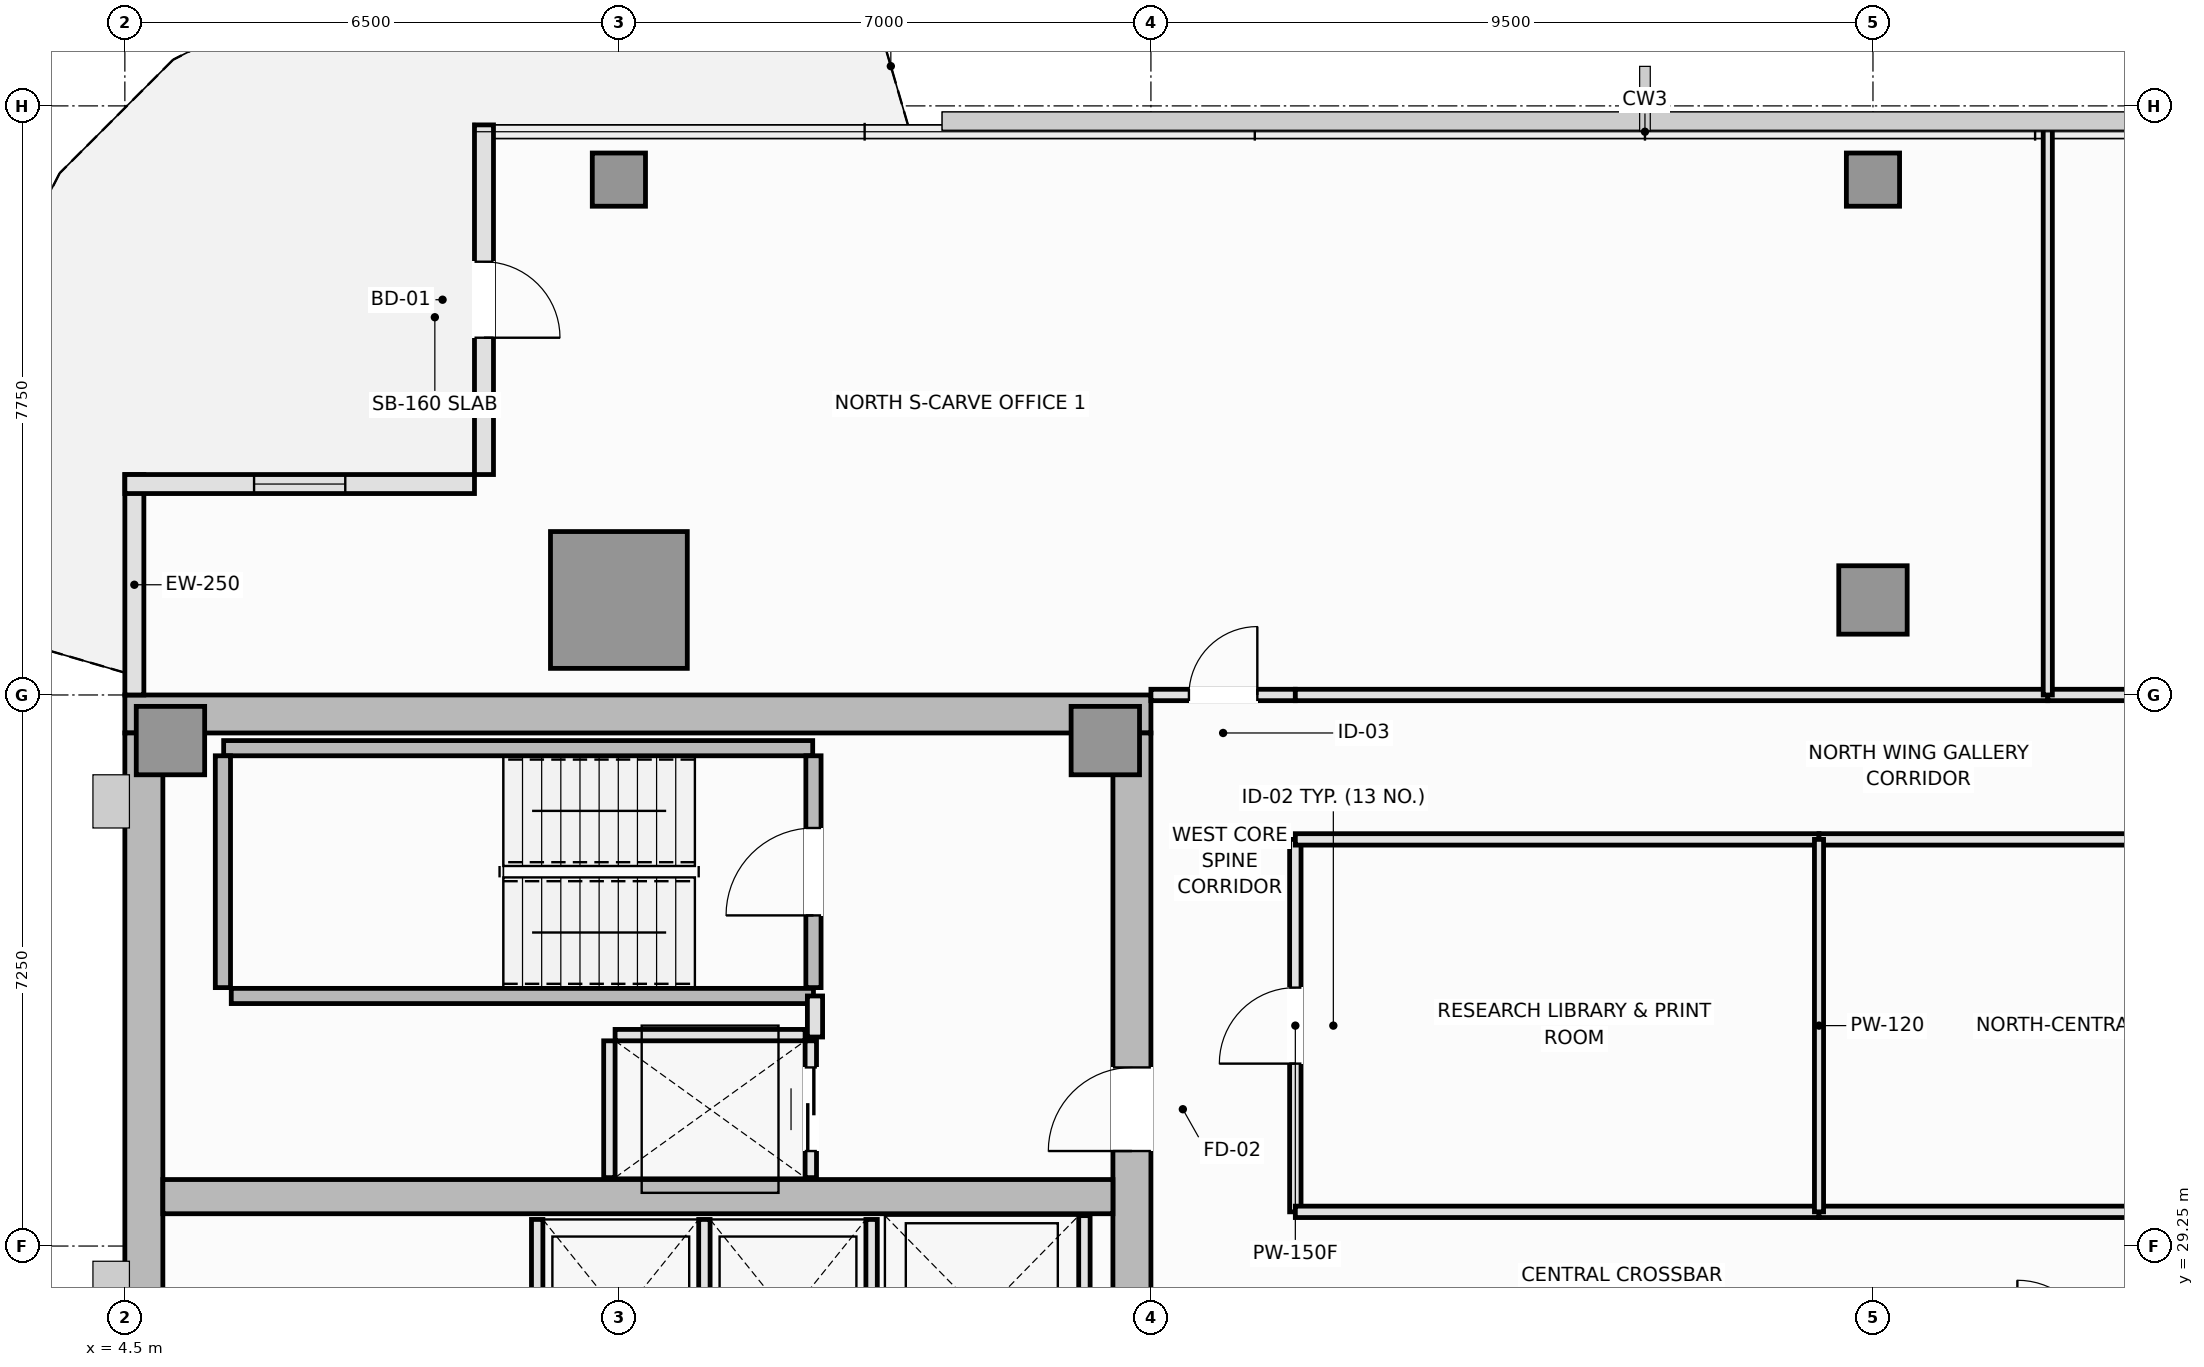
"""IFC4 building model, lengths in metres.
Left out: names, types, materials, properties, quantities, classifications, styles, units other than length and angle.
Written with IfcOpenShell. Run it as: python <this file> out.ifc"""

import sys

from ifc_helpers import new_model, si_unit, direction, frame, frame_2d, origin, origin_2d, place, context, subcontext, project, spatial, rectangle, extrude, element, fill, save


model = new_model("IFC4")
c1 = context("Model", 3, precision=1e-05, world=origin(), true_north=direction((0.0, 1.0)))
c2 = subcontext(c1, "Body", "Model", "MODEL_VIEW")
j1 = project(units=[si_unit("LENGTHUNIT", "METRE"), si_unit("PLANEANGLEUNIT", "RADIAN")], contexts=[c1])
p1 = place(None, origin())
s1 = spatial("IfcSite", under=j1, at=p1, CompositionType="ELEMENT")
p2 = place(p1, origin())
s2 = spatial("IfcBuilding", under=s1, at=p2, CompositionType="ELEMENT")
p3 = place(p2, frame((0.0, 0.0, 284.75)))
s3 = spatial("IfcBuildingStorey", under=s2, at=p3, CompositionType="ELEMENT", Elevation=284.75)
p4 = place(p3, frame((4.5, 36.25, 0.0), z_axis=(0.0, 0.0, 1.0), x_axis=(1.0, 0.0, 0.0)))
e1 = element("IfcWall", 1, at=p4, inside=s3, PredefinedType="SHEAR", context=c2, shape_type="SweptSolid", body=[
    extrude(rectangle(XDim=13.5, YDim=0.5, at=frame_2d((6.75, 0.0))), origin(), (0.0, 0.0, 1.0), 3.55),
])
p5 = place(p3, frame((4.75, 14.5, 0.0), z_axis=(0.0, 0.0, 1.0), x_axis=(0.0, 1.0, 0.0)))
e2 = element("IfcWall", 2, at=p5, inside=s3, PredefinedType="SHEAR", context=c2, shape_type="SweptSolid", body=[
    extrude(rectangle(XDim=21.5, YDim=0.5, at=frame_2d((10.75, 0.0))), origin(), (0.0, 0.0, 1.0), 3.55),
])
p6 = place(p3, frame((17.75, 27.05, 0.0), z_axis=(0.0, 0.0, 1.0), x_axis=(0.0, 1.0, 0.0)))
e3 = element("IfcWall", 3, at=p6, inside=s3, PredefinedType="SHEAR", context=c2, shape_type="SweptSolid", body=[
    extrude(rectangle(XDim=8.95, YDim=0.5, at=frame_2d((4.475, 0.0))), origin(), (0.0, 0.0, 1.0), 3.55),
])
p7 = place(p6, frame((3.45, 0.0, 0.0)))
e4 = element("IfcOpeningElement", 4, at=p7, cuts=e3, PredefinedType="OPENING", context=c2, shape_type="SweptSolid", body=[
    extrude(rectangle(XDim=1.1, YDim=2.15, at=frame_2d((0.55, 1.075))), frame((0.0, 0.26, 0.0), z_axis=(0.0, -1.0, 0.0), x_axis=(1.0, 0.0, 0.0)), (0.0, 0.0, 1.0), 0.52),
])
p8 = place(p3, frame((5.0, 29.9, 0.0), z_axis=(0.0, 0.0, 1.0), x_axis=(1.0, 0.0, 0.0)))
e5 = element("IfcWall", 5, at=p8, inside=s3, PredefinedType="SHEAR", context=c2, shape_type="SweptSolid", body=[
    extrude(rectangle(XDim=12.5, YDim=0.45, at=frame_2d((6.25, 0.0))), origin(), (0.0, 0.0, 1.0), 3.55),
])
for number, where, z_axis, x_axis in (
    (6, (5.1, 35.9, 0.0), (0.0, 0.0, 1.0), (1.0, 0.0, 0.0)),
    (7, (17.4, 35.9, 0.0), (0.0, 0.0, 1.0), (1.0, 0.0, 0.0)),
):
    element("IfcColumn", number, at=place(p3, frame(where, z_axis=z_axis, x_axis=x_axis)), inside=s3, PredefinedType="PILASTER", context=c2, shape_type="SweptSolid", body=[
        extrude(rectangle(XDim=0.9, YDim=0.9, at=origin_2d()), origin(), (0.0, 0.0, 1.0), 3.55),
    ])
p9 = place(p3, frame((11.0, 37.75, 0.0), z_axis=(0.0, 0.0, 1.0), x_axis=(1.0, 0.0, 0.0)))
e8 = element("IfcColumn", 8, at=p9, inside=s3, PredefinedType="COLUMN", context=c2, shape_type="SweptSolid", body=[
    extrude(rectangle(XDim=1.8, YDim=1.8, at=origin_2d()), origin(), (0.0, 0.0, 1.0), 3.55),
])
p10 = place(p3, frame((27.5, 37.75, 0.0), z_axis=(0.0, 0.0, 1.0), x_axis=(1.0, 0.0, 0.0)))
e9 = element("IfcColumn", 9, at=p10, inside=s3, PredefinedType="COLUMN", context=c2, shape_type="SweptSolid", body=[
    extrude(rectangle(XDim=0.9, YDim=0.9, at=origin_2d()), origin(), (0.0, 0.0, 1.0), 3.55),
])
for number, where, z_axis, x_axis in (
    (10, (11.0, 43.28, 0.0), (0.0, 0.0, 1.0), (1.0, 0.0, 0.0)),
    (11, (27.5, 43.28, 0.0), (0.0, 0.0, 1.0), (1.0, 0.0, 0.0)),
):
    element("IfcColumn", number, at=place(p3, frame(where, z_axis=z_axis, x_axis=x_axis)), inside=s3, PredefinedType="COLUMN", context=c2, shape_type="SweptSolid", body=[
        extrude(rectangle(XDim=0.7, YDim=0.7, at=origin_2d()), origin(), (0.0, 0.0, 1.0), 3.55),
    ])
p11 = place(p3, frame((4.625, 39.4, 0.0), z_axis=(0.0, 0.0, 1.0), x_axis=(0.0, -1.0, 0.0)))
e12 = element("IfcWall", 12, at=p11, inside=s3, PredefinedType="SOLIDWALL", context=c2, shape_type="SweptSolid", body=[
    extrude(rectangle(XDim=2.9, YDim=0.25, at=frame_2d((1.45, 0.0))), origin(), (0.0, 0.0, 1.0), 3.39),
])
p12 = place(p3, frame((9.225, 44.0, 0.0), z_axis=(0.0, 0.0, 1.0), x_axis=(0.0, -1.0, 0.0)))
e13 = element("IfcWall", 13, at=p12, inside=s3, PredefinedType="SOLIDWALL", context=c2, shape_type="SweptSolid", body=[
    extrude(rectangle(XDim=4.6, YDim=0.25, at=frame_2d((2.3, 0.0))), origin(), (0.0, 0.0, 1.0), 3.39),
])
p13 = place(p12, frame((1.8, 0.0, 0.0)))
e14 = element("IfcOpeningElement", 14, at=p13, cuts=e13, PredefinedType="OPENING", context=c2, shape_type="SweptSolid", body=[
    extrude(rectangle(XDim=1.0, YDim=2.2, at=frame_2d((0.5, 1.1))), frame((0.0, 0.135, 0.0), z_axis=(0.0, -1.0, 0.0), x_axis=(1.0, 0.0, 0.0)), (0.0, 0.0, 1.0), 0.27),
])
p14 = place(p3, frame((9.1, 39.275, 0.0), z_axis=(0.0, 0.0, 1.0), x_axis=(-1.0, 0.0, 0.0)))
e15 = element("IfcWall", 15, at=p14, inside=s3, PredefinedType="SOLIDWALL", context=c2, shape_type="SweptSolid", body=[
    extrude(rectangle(XDim=4.6, YDim=0.25, at=frame_2d((2.3, 0.0))), origin(), (0.0, 0.0, 1.0), 3.12),
])
p15 = place(p14, frame((1.7, 0.0, 0.9)))
e16 = element("IfcOpeningElement", 16, at=p15, cuts=e15, PredefinedType="OPENING", context=c2, shape_type="SweptSolid", body=[
    extrude(rectangle(XDim=1.2, YDim=1.8, at=frame_2d((0.6, 0.9))), frame((0.0, 0.135, 0.0), z_axis=(0.0, -1.0, 0.0), x_axis=(1.0, 0.0, 0.0)), (0.0, 0.0, 1.0), 0.27),
])
p16 = place(p3, frame((5.8, 35.8, 0.0), z_axis=(0.0, 0.0, 1.0), x_axis=(1.0, 0.0, 0.0)))
e17 = element("IfcWall", 17, at=p16, inside=s3, PredefinedType="SOLIDWALL", context=c2, shape_type="SweptSolid", body=[
    extrude(rectangle(XDim=7.75, YDim=0.2, at=frame_2d((3.875, 0.0))), origin(), (0.0, 0.0, 1.0), 3.55),
])
p17 = place(p3, frame((5.79, 32.65, 0.0), z_axis=(0.0, 0.0, 1.0), x_axis=(0.0, 1.0, 0.0)))
e18 = element("IfcWall", 18, at=p17, inside=s3, PredefinedType="SOLIDWALL", context=c2, shape_type="SweptSolid", body=[
    extrude(rectangle(XDim=3.05, YDim=0.2, at=frame_2d((1.525, 0.0))), origin(), (0.0, 0.0, 1.0), 3.55),
])
p18 = place(p3, frame((5.9, 32.54, 0.0), z_axis=(0.0, 0.0, 1.0), x_axis=(1.0, 0.0, 0.0)))
e19 = element("IfcWall", 19, at=p18, inside=s3, PredefinedType="SOLIDWALL", context=c2, shape_type="SweptSolid", body=[
    extrude(rectangle(XDim=7.66, YDim=0.2, at=frame_2d((3.83, 0.0))), origin(), (0.0, 0.0, 1.0), 3.55),
])
p19 = place(p3, frame((13.56, 32.65, 0.0), z_axis=(0.0, 0.0, 1.0), x_axis=(0.0, 1.0, 0.0)))
e20 = element("IfcWall", 20, at=p19, inside=s3, PredefinedType="SOLIDWALL", context=c2, shape_type="SweptSolid", body=[
    extrude(rectangle(XDim=3.05, YDim=0.2, at=frame_2d((1.525, 0.0))), origin(), (0.0, 0.0, 1.0), 3.55),
])
p20 = place(p19, frame((0.95, 0.0, 0.0)))
e21 = element("IfcOpeningElement", 21, at=p20, cuts=e20, PredefinedType="OPENING", context=c2, shape_type="SweptSolid", body=[
    extrude(rectangle(XDim=1.15, YDim=2.15, at=frame_2d((0.575, 1.075))), frame((0.0, 0.11, 0.0), z_axis=(0.0, -1.0, 0.0), x_axis=(1.0, 0.0, 0.0)), (0.0, 0.0, 1.0), 0.22),
])
for number, where, z_axis, x_axis in (
    (22, (9.925, 27.05, 0.0), (0.0, 0.0, 1.0), (0.0, 1.0, 0.0)),
    (23, (12.125, 27.05, 0.0), (0.0, 0.0, 1.0), (0.0, 1.0, 0.0)),
    (24, (14.325, 27.05, 0.0), (0.0, 0.0, 1.0), (0.0, 1.0, 0.0)),
):
    element("IfcWall", number, at=place(p3, frame(where, z_axis=z_axis, x_axis=x_axis)), inside=s3, PredefinedType="PARTITIONING", context=c2, shape_type="SweptSolid", body=[
        extrude(rectangle(XDim=2.55, YDim=0.15, at=frame_2d((1.275, 0.0))), origin(), (0.0, 0.0, 1.0), 3.39),
    ])
p21 = place(p3, frame((17.125, 27.05, 0.0), z_axis=(0.0, 0.0, 1.0), x_axis=(0.0, 1.0, 0.0)))
e25 = element("IfcWall", 25, at=p21, inside=s3, PredefinedType="PARTITIONING", context=c2, shape_type="SweptSolid", body=[
    extrude(rectangle(XDim=2.6, YDim=0.15, at=frame_2d((1.3, 0.0))), origin(), (0.0, 0.0, 1.0), 3.39),
])
p22 = place(p3, frame((10.95, 32.025, 0.0), z_axis=(0.0, 0.0, 1.0), x_axis=(1.0, 0.0, 0.0)))
e26 = element("IfcWall", 26, at=p22, inside=s3, PredefinedType="PARTITIONING", context=c2, shape_type="SweptSolid", body=[
    extrude(rectangle(XDim=2.5, YDim=0.15, at=frame_2d((1.25, 0.0))), origin(), (0.0, 0.0, 1.0), 3.39),
])
p23 = place(p3, frame((10.875, 30.15, 0.0), z_axis=(0.0, 0.0, 1.0), x_axis=(0.0, 1.0, 0.0)))
e27 = element("IfcWall", 27, at=p23, inside=s3, PredefinedType="PARTITIONING", context=c2, shape_type="SweptSolid", body=[
    extrude(rectangle(XDim=1.8, YDim=0.15, at=frame_2d((0.9, 0.0))), origin(), (0.0, 0.0, 1.0), 3.39),
])
p24 = place(p3, frame((13.525, 30.15, 0.0), z_axis=(0.0, 0.0, 1.0), x_axis=(0.0, 1.0, 0.0)))
e28 = element("IfcWall", 28, at=p24, inside=s3, PredefinedType="PARTITIONING", context=c2, shape_type="SweptSolid", body=[
    extrude(rectangle(XDim=1.8, YDim=0.15, at=frame_2d((0.9, 0.0))), origin(), (0.0, 0.0, 1.0), 3.39),
])
p25 = place(p24, frame((0.35, 0.0, 0.0)))
e29 = element("IfcOpeningElement", 29, at=p25, cuts=e28, PredefinedType="OPENING", context=c2, shape_type="SweptSolid", body=[
    extrude(rectangle(XDim=1.1, YDim=2.2, at=frame_2d((0.55, 1.1))), frame((0.0, 0.085, 0.0), z_axis=(0.0, -1.0, 0.0), x_axis=(1.0, 0.0, 0.0)), (0.0, 0.0, 1.0), 0.17),
])
p26 = place(p3, frame((13.58, 32.0, 0.0), z_axis=(0.0, 0.0, 1.0), x_axis=(0.0, 1.0, 0.0)))
e30 = element("IfcWall", 30, at=p26, inside=s3, PredefinedType="PARTITIONING", context=c2, shape_type="SweptSolid", body=[
    extrude(rectangle(XDim=0.54, YDim=0.2, at=frame_2d((0.27, 0.0))), origin(), (0.0, 0.0, 1.0), 3.39),
])
p27 = place(p3, frame((19.9, 29.7, 0.0), z_axis=(0.0, 0.0, 1.0), x_axis=(0.0, 1.0, 0.0)))
e31 = element("IfcWall", 31, at=p27, inside=s3, PredefinedType="PARTITIONING", context=c2, shape_type="SweptSolid", body=[
    extrude(rectangle(XDim=4.9, YDim=0.15, at=frame_2d((2.45, 0.0))), origin(), (0.0, 0.0, 1.0), 3.39),
])
p28 = place(p27, frame((1.95, 0.0, 0.0)))
e32 = element("IfcOpeningElement", 32, at=p28, cuts=e31, PredefinedType="OPENING", context=c2, shape_type="SweptSolid", body=[
    extrude(rectangle(XDim=1.0, YDim=2.15, at=frame_2d((0.5, 1.075))), frame((0.0, 0.085, 0.0), z_axis=(0.0, -1.0, 0.0), x_axis=(1.0, 0.0, 0.0)), (0.0, 0.0, 1.0), 0.17),
])
p29 = place(p3, frame((18.0, 36.5, 0.0), z_axis=(0.0, 0.0, 1.0), x_axis=(1.0, 0.0, 0.0)))
e33 = element("IfcWall", 33, at=p29, inside=s3, PredefinedType="PARTITIONING", context=c2, shape_type="SweptSolid", body=[
    extrude(rectangle(XDim=1.9, YDim=0.15, at=frame_2d((0.95, 0.0))), origin(), (0.0, 0.0, 1.0), 3.39),
])
p30 = place(p29, frame((0.5, 0.0, 0.0)))
e34 = element("IfcOpeningElement", 34, at=p30, cuts=e33, PredefinedType="OPENING", context=c2, shape_type="SweptSolid", body=[
    extrude(rectangle(XDim=0.9, YDim=2.1, at=frame_2d((0.45, 1.05))), frame((0.0, 0.085, 0.0), z_axis=(0.0, -1.0, 0.0), x_axis=(1.0, 0.0, 0.0)), (0.0, 0.0, 1.0), 0.17),
])
p31 = place(p3, frame((19.9, 29.7, 0.0), z_axis=(0.0, 0.0, 1.0), x_axis=(1.0, 0.0, 0.0)))
e35 = element("IfcWall", 35, at=p31, inside=s3, PredefinedType="PARTITIONING", context=c2, shape_type="SweptSolid", body=[
    extrude(rectangle(XDim=6.89, YDim=0.15, at=frame_2d((3.445, 0.0))), origin(), (0.0, 0.0, 1.0), 3.39),
])
p32 = place(p3, frame((26.79, 29.7, 0.0), z_axis=(0.0, 0.0, 1.0), x_axis=(1.0, 0.0, 0.0)))
e36 = element("IfcWall", 36, at=p32, inside=s3, PredefinedType="PARTITIONING", context=c2, shape_type="SweptSolid", body=[
    extrude(rectangle(XDim=9.51, YDim=0.15, at=frame_2d((4.755, 0.0))), origin(), (0.0, 0.0, 1.0), 3.39),
])
p33 = place(p3, frame((19.9, 34.6, 0.0), z_axis=(0.0, 0.0, 1.0), x_axis=(1.0, 0.0, 0.0)))
e37 = element("IfcWall", 37, at=p33, inside=s3, PredefinedType="PARTITIONING", context=c2, shape_type="SweptSolid", body=[
    extrude(rectangle(XDim=6.89, YDim=0.15, at=frame_2d((3.445, 0.0))), origin(), (0.0, 0.0, 1.0), 3.39),
])
p34 = place(p3, frame((26.79, 34.6, 0.0), z_axis=(0.0, 0.0, 1.0), x_axis=(1.0, 0.0, 0.0)))
e38 = element("IfcWall", 38, at=p34, inside=s3, PredefinedType="PARTITIONING", context=c2, shape_type="SweptSolid", body=[
    extrude(rectangle(XDim=9.51, YDim=0.15, at=frame_2d((4.755, 0.0))), origin(), (0.0, 0.0, 1.0), 3.39),
])
p35 = place(p3, frame((19.9, 36.5, 0.0), z_axis=(0.0, 0.0, 1.0), x_axis=(1.0, 0.0, 0.0)))
e39 = element("IfcWall", 39, at=p35, inside=s3, PredefinedType="PARTITIONING", context=c2, shape_type="SweptSolid", body=[
    extrude(rectangle(XDim=9.9, YDim=0.15, at=frame_2d((4.95, 0.0))), origin(), (0.0, 0.0, 1.0), 3.39),
])
p36 = place(p3, frame((29.8, 36.5, 0.0), z_axis=(0.0, 0.0, 1.0), x_axis=(1.0, 0.0, 0.0)))
e40 = element("IfcWall", 40, at=p36, inside=s3, PredefinedType="PARTITIONING", context=c2, shape_type="SweptSolid", body=[
    extrude(rectangle(XDim=4.2, YDim=0.15, at=frame_2d((2.1, 0.0))), origin(), (0.0, 0.0, 1.0), 3.39),
])
p37 = place(p36, frame((1.6, 0.0, 0.0)))
e41 = element("IfcOpeningElement", 41, at=p37, cuts=e40, PredefinedType="OPENING", context=c2, shape_type="SweptSolid", body=[
    extrude(rectangle(XDim=1.0, YDim=2.15, at=frame_2d((0.5, 1.075))), frame((0.0, 0.085, 0.0), z_axis=(0.0, -1.0, 0.0), x_axis=(1.0, 0.0, 0.0)), (0.0, 0.0, 1.0), 0.17),
])
p38 = place(p3, frame((26.79, 29.7, 0.0), z_axis=(0.0, 0.0, 1.0), x_axis=(0.0, 1.0, 0.0)))
e42 = element("IfcWall", 42, at=p38, inside=s3, PredefinedType="PARTITIONING", context=c2, shape_type="SweptSolid", body=[
    extrude(rectangle(XDim=4.9, YDim=0.12, at=frame_2d((2.45, 0.0))), origin(), (0.0, 0.0, 1.0), 3.39),
])
p39 = place(p3, frame((29.8, 36.5, 0.0), z_axis=(0.0, 0.0, 1.0), x_axis=(0.0, 1.0, 0.0)))
e43 = element("IfcWall", 43, at=p39, inside=s3, PredefinedType="PARTITIONING", context=c2, shape_type="SweptSolid", body=[
    extrude(rectangle(XDim=7.49, YDim=0.12, at=frame_2d((3.745, 0.0))), origin(), (0.0, 0.0, 1.0), 3.39),
])
p40 = place(p13, frame((1.0, 0.0, 0.0), z_axis=(0.0, 0.0, 1.0), x_axis=(-1.0, 0.0, 0.0)))
e44 = element("IfcDoor", 44, at=p40, inside=s3, OperationType="SINGLE_SWING_RIGHT", PredefinedType="DOOR", context=c2, shape_type="SweptSolid", body=[
    extrude(rectangle(XDim=1.0, YDim=2.2, at=frame_2d((0.5, 1.1))), frame((0.0, 0.025, 0.0), z_axis=(0.0, -1.0, 0.0), x_axis=(1.0, 0.0, 0.0)), (0.0, 0.0, 1.0), 0.05),
])
fill(e14, e44)
p41 = place(p15, origin())
e45 = element("IfcWindow", 45, at=p41, inside=s3, PartitioningType="SINGLE_PANEL", PredefinedType="WINDOW", context=c2, shape_type="SweptSolid", body=[
    extrude(rectangle(XDim=1.2, YDim=1.8, at=frame_2d((0.6, 0.9))), frame((0.0, 0.03, 0.0), z_axis=(0.0, -1.0, 0.0), x_axis=(1.0, 0.0, 0.0)), (0.0, 0.0, 1.0), 0.06),
])
fill(e16, e45)
p42 = place(p20, origin())
e46 = element("IfcDoor", 46, at=p42, inside=s3, OperationType="SINGLE_SWING_LEFT", PredefinedType="DOOR", context=c2, shape_type="SweptSolid", body=[
    extrude(rectangle(XDim=1.15, YDim=2.15, at=frame_2d((0.575, 1.075))), frame((0.0, 0.025, 0.0), z_axis=(0.0, -1.0, 0.0), x_axis=(1.0, 0.0, 0.0)), (0.0, 0.0, 1.0), 0.05),
])
fill(e21, e46)
p43 = place(p25, origin())
e47 = element("IfcDoor", 47, at=p43, inside=s3, OperationType="DOUBLE_DOOR_SLIDING", PredefinedType="DOOR", context=c2, shape_type="SweptSolid", body=[
    extrude(rectangle(XDim=1.1, YDim=2.2, at=frame_2d((0.55, 1.1))), frame((0.0, 0.025, 0.0), z_axis=(0.0, -1.0, 0.0), x_axis=(1.0, 0.0, 0.0)), (0.0, 0.0, 1.0), 0.05),
])
fill(e29, e47)
p44 = place(p7, origin())
e48 = element("IfcDoor", 48, at=p44, inside=s3, OperationType="SINGLE_SWING_LEFT", PredefinedType="DOOR", context=c2, shape_type="SweptSolid", body=[
    extrude(rectangle(XDim=1.1, YDim=2.15, at=frame_2d((0.55, 1.075))), frame((0.0, 0.025, 0.0), z_axis=(0.0, -1.0, 0.0), x_axis=(1.0, 0.0, 0.0)), (0.0, 0.0, 1.0), 0.05),
])
fill(e4, e48)
p45 = place(p28, origin())
e49 = element("IfcDoor", 49, at=p45, inside=s3, OperationType="SINGLE_SWING_LEFT", PredefinedType="DOOR", context=c2, shape_type="SweptSolid", body=[
    extrude(rectangle(XDim=1.0, YDim=2.15, at=frame_2d((0.5, 1.075))), frame((0.0, 0.025, 0.0), z_axis=(0.0, -1.0, 0.0), x_axis=(1.0, 0.0, 0.0)), (0.0, 0.0, 1.0), 0.05),
])
fill(e32, e49)
p46 = place(p30, origin())
e50 = element("IfcDoor", 50, at=p46, inside=s3, OperationType="SINGLE_SWING_RIGHT", PredefinedType="DOOR", context=c2, shape_type="SweptSolid", body=[
    extrude(rectangle(XDim=0.9, YDim=2.1, at=frame_2d((0.45, 1.05))), frame((0.0, 0.025, 0.0), z_axis=(0.0, -1.0, 0.0), x_axis=(1.0, 0.0, 0.0)), (0.0, 0.0, 1.0), 0.05),
])
fill(e34, e50)
save(model, sys.argv[1])
